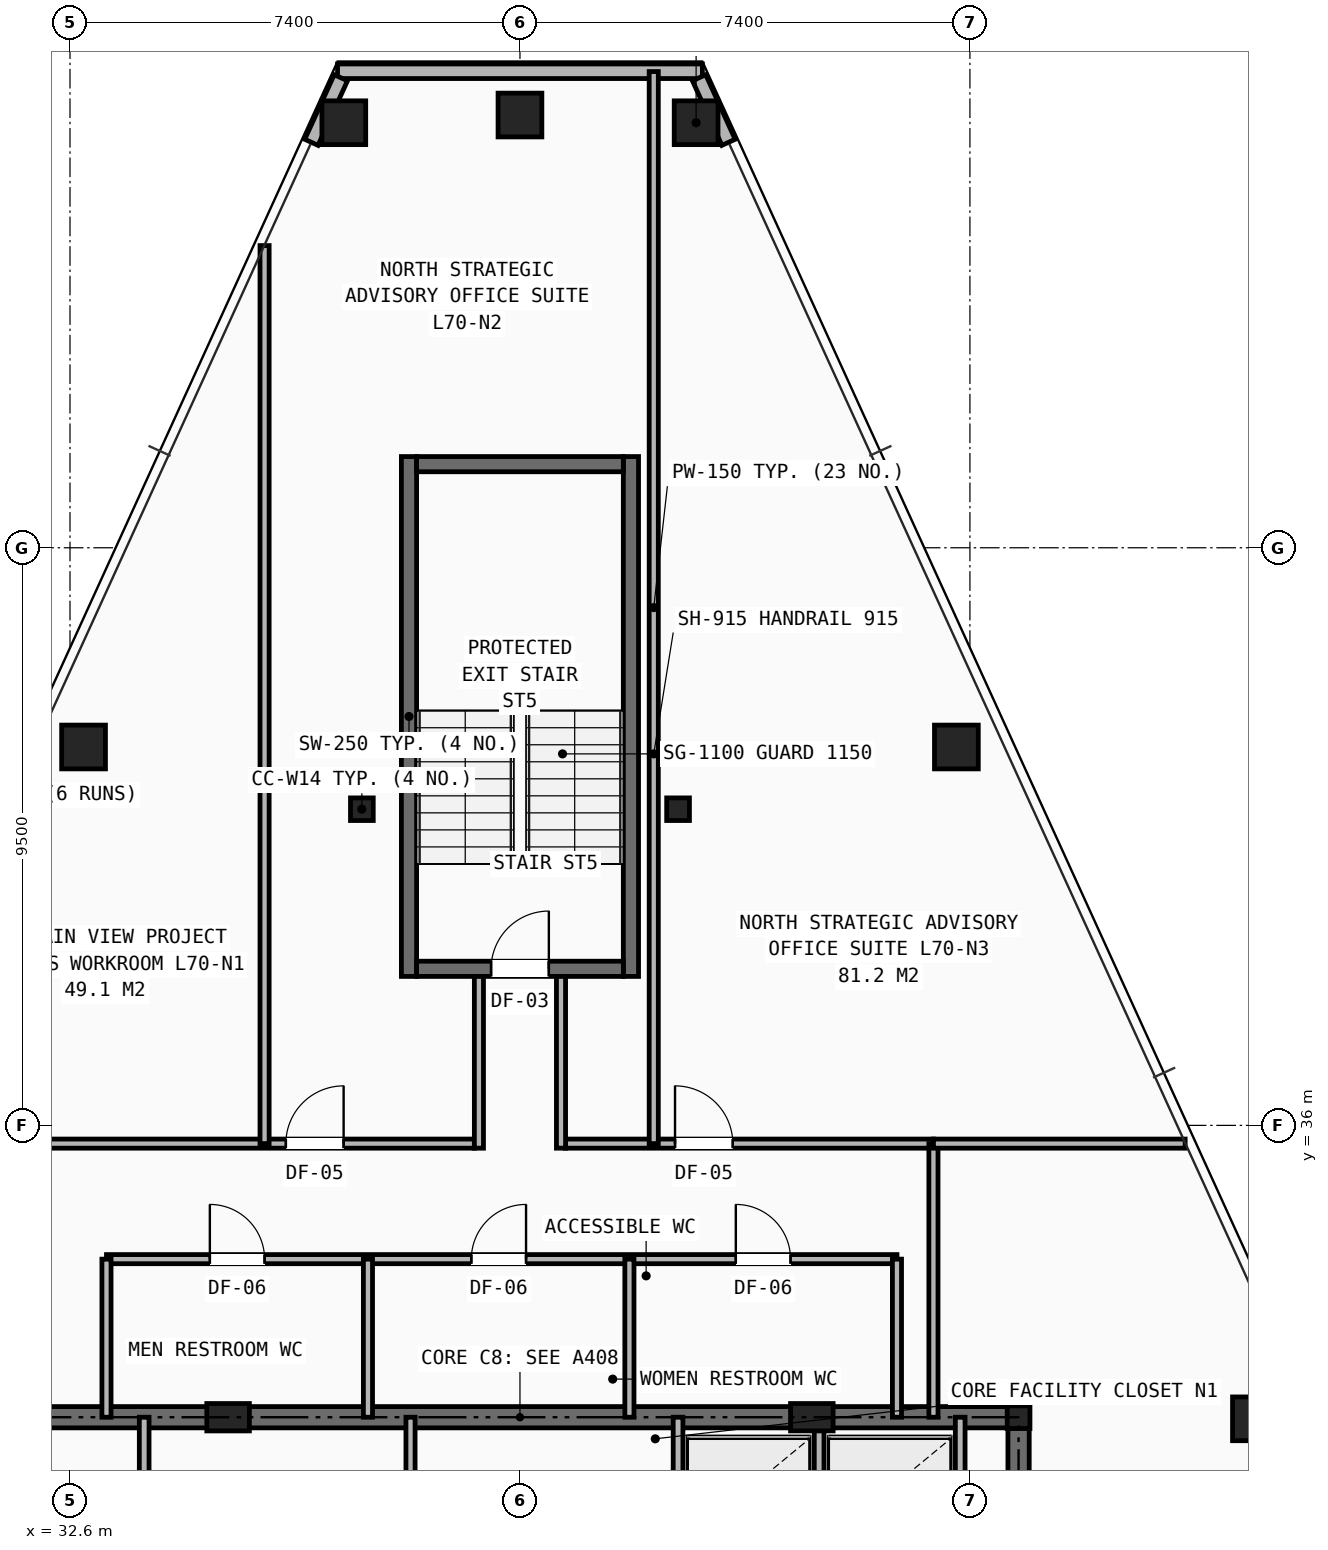
"""IFC4 building model, lengths in metres.
Left out: names, types, materials, properties, quantities, classifications, styles, units other than length and angle.
Written with IfcOpenShell. Run it as: python <this file> out.ifc"""

import sys

from ifc_helpers import new_model, si_unit, direction, frame, frame_2d, origin, origin_2d, place, context, subcontext, project, spatial, rectangle, hollow_rectangle, i_section, extrude, element, fill, save


model = new_model("IFC4")
c1 = context("Model", 3, precision=1e-05, world=origin(), true_north=direction((0.0, 1.0)))
c2 = subcontext(c1, "Body", "Model", "MODEL_VIEW")
j1 = project(units=[si_unit("LENGTHUNIT", "METRE"), si_unit("PLANEANGLEUNIT", "RADIAN")], contexts=[c1])
p1 = place(None, origin())
s1 = spatial("IfcSite", under=j1, at=p1, CompositionType="ELEMENT")
p2 = place(p1, origin())
s2 = spatial("IfcBuilding", under=s1, at=p2, CompositionType="ELEMENT")
p3 = place(p2, frame((0.0, 0.0, 246.9)))
s3 = spatial("IfcBuildingStorey", under=s2, at=p3, CompositionType="ELEMENT", Elevation=246.9)
for number, where, z_axis, x_axis in (
    (1, (48.2, 31.2, 0.0), (0.0, 0.0, 1.0), (1.0, 0.0, 0.0)),
    (2, (37.4, 41.2, 0.0), (0.0, 0.0, 1.0), (1.0, 0.0, 0.0)),
    (3, (42.6, 41.2, 0.0), (0.0, 0.0, 1.0), (1.0, 0.0, 0.0)),
):
    element("IfcColumn", number, at=place(p3, frame(where, z_axis=z_axis, x_axis=x_axis)), inside=s3, PredefinedType="COLUMN", context=c2, shape_type="SweptSolid", body=[
        extrude(i_section(OverallWidth=0.374, OverallDepth=0.372, WebThickness=0.016, FlangeThickness=0.026, at=origin_2d()), origin(), (0.0, 0.0, 1.0), 3.5),
    ])
for number, where, z_axis, x_axis in (
    (4, (35.2, 31.2, 0.0), (0.0, 0.0, 1.0), (1.0, 0.0, 0.0)),
    (5, (44.8, 31.2, 0.0), (0.0, 0.0, 1.0), (1.0, 0.0, 0.0)),
):
    element("IfcColumn", number, at=place(p3, frame(where, z_axis=z_axis, x_axis=x_axis)), inside=s3, PredefinedType="PILASTER", context=c2, shape_type="SweptSolid", body=[
        extrude(rectangle(XDim=0.7, YDim=0.45, at=origin_2d()), origin(), (0.0, 0.0, 1.0), 3.5),
    ])
for number, where, z_axis, x_axis in (
    (6, (42.897, 52.49, 0.0), (0.0, 0.0, 1.0), (1.0, 0.0, 0.0)),
    (7, (40.0, 52.617, 0.0), (0.0, 0.0, 1.0), (1.0, 0.0, 0.0)),
    (8, (37.103, 52.49, 0.0), (0.0, 0.0, 1.0), (1.0, 0.0, 0.0)),
    (9, (32.823, 42.223, 0.0), (0.0, 0.0, 1.0), (1.0, 0.0, 0.0)),
    (10, (52.079, 31.174, 0.0), (0.0, 0.0, 1.0), (1.0, 0.0, 0.0)),
    (11, (47.177, 42.223, 0.0), (0.0, 0.0, 1.0), (1.0, 0.0, 0.0)),
):
    element("IfcColumn", number, at=place(p3, frame(where, z_axis=z_axis, x_axis=x_axis)), inside=s3, PredefinedType="COLUMN", context=c2, shape_type="SweptSolid", body=[
        extrude(hollow_rectangle(XDim=0.72, YDim=0.72, WallThickness=0.05, at=origin_2d()), origin(), (0.0, 0.0, 1.0), 3.5),
    ])
p4 = place(p3, frame((37.0, 53.337, 0.0), z_axis=(0.0, 0.0, 1.0), x_axis=(1.0, 0.0, 0.0)))
e12 = element("IfcWall", 12, at=p4, inside=s3, PredefinedType="SHEAR", context=c2, shape_type="SweptSolid", body=[
    extrude(rectangle(XDim=6.0, YDim=0.24, at=frame_2d((3.0, 0.0))), origin(), (0.0, 0.0, 1.0), 2.573),
])
for number, where, z_axis, x_axis in (
    (13, (37.054, 53.23, 0.0), (0.0, 0.0, 1.0), (-0.415, -0.91, 0.0)),
    (14, (43.43, 52.168, 0.0), (0.0, 0.0, 1.0), (-0.415, 0.91, 0.0)),
):
    element("IfcWall", number, at=place(p3, frame(where, z_axis=z_axis, x_axis=x_axis)), inside=s3, PredefinedType="SHEAR", context=c2, shape_type="SweptSolid", body=[
        extrude(rectangle(XDim=1.167, YDim=0.24, at=frame_2d((0.583, 0.0))), origin(), (0.0, 0.0, 1.0), 2.573),
    ])
p5 = place(p3, frame((31.8, 31.2, 0.0), z_axis=(0.0, 0.0, 1.0), x_axis=(1.0, 0.0, 0.0)))
e15 = element("IfcWall", 15, at=p5, inside=s3, PredefinedType="SHEAR", context=c2, shape_type="SweptSolid", body=[
    extrude(rectangle(XDim=16.4, YDim=0.35, at=frame_2d((8.2, 0.0))), origin(), (0.0, 0.0, 1.0), 3.2),
])
p6 = place(p3, frame((48.2, 16.4, 0.0), z_axis=(0.0, 0.0, 1.0), x_axis=(0.0, 1.0, 0.0)))
e16 = element("IfcWall", 16, at=p6, inside=s3, PredefinedType="SHEAR", context=c2, shape_type="SweptSolid", body=[
    extrude(rectangle(XDim=14.8, YDim=0.35, at=frame_2d((7.4, 0.0))), origin(), (0.0, 0.0, 1.0), 3.2),
])
p7 = place(p6, frame((11.0, 0.0, 0.0)))
e17 = element("IfcOpeningElement", 17, at=p7, cuts=e16, PredefinedType="OPENING", context=c2, shape_type="SweptSolid", body=[
    extrude(rectangle(XDim=1.1, YDim=2.15, at=frame_2d((0.55, 1.075))), frame((0.0, 0.185, 0.0), z_axis=(0.0, -1.0, 0.0), x_axis=(1.0, 0.0, 0.0)), (0.0, 0.0, 1.0), 0.37),
])
p8 = place(p3, frame((33.82, 29.02, 0.0), z_axis=(0.0, 0.0, 1.0), x_axis=(0.0, 1.0, 0.0)))
e18 = element("IfcWall", 18, at=p8, inside=s3, PredefinedType="SOLIDWALL", context=c2, shape_type="SweptSolid", body=[
    extrude(rectangle(XDim=2.18, YDim=0.16, at=frame_2d((1.09, 0.0))), origin(), (0.0, 0.0, 1.0), 2.928),
])
p9 = place(p3, frame((38.2, 29.02, 0.0), z_axis=(0.0, 0.0, 1.0), x_axis=(0.0, 1.0, 0.0)))
e19 = element("IfcWall", 19, at=p9, inside=s3, PredefinedType="PARTITIONING", context=c2, shape_type="SweptSolid", body=[
    extrude(rectangle(XDim=2.18, YDim=0.15, at=frame_2d((1.09, 0.0))), origin(), (0.0, 0.0, 1.0), 2.928),
])
for number, where, z_axis, x_axis in (
    (20, (42.6, 29.02, 0.0), (0.0, 0.0, 1.0), (0.0, 1.0, 0.0)),
    (21, (44.92, 29.02, 0.0), (0.0, 0.0, 1.0), (0.0, 1.0, 0.0)),
    (22, (47.24, 29.02, 0.0), (0.0, 0.0, 1.0), (0.0, 1.0, 0.0)),
):
    element("IfcWall", number, at=place(p3, frame(where, z_axis=z_axis, x_axis=x_axis)), inside=s3, PredefinedType="SOLIDWALL", context=c2, shape_type="SweptSolid", body=[
        extrude(rectangle(XDim=2.18, YDim=0.16, at=frame_2d((1.09, 0.0))), origin(), (0.0, 0.0, 1.0), 2.928),
    ])
p10 = place(p3, frame((33.2, 33.8, 0.0), z_axis=(0.0, 0.0, 1.0), x_axis=(1.0, 0.0, 0.0)))
e23 = element("IfcWall", 23, at=p10, inside=s3, PredefinedType="PARTITIONING", context=c2, shape_type="SweptSolid", body=[
    extrude(rectangle(XDim=13.0, YDim=0.15, at=frame_2d((6.5, 0.0))), origin(), (0.0, 0.0, 1.0), 3.2),
])
p11 = place(p10, frame((1.7, 0.0, 0.0)))
e24 = element("IfcOpeningElement", 24, at=p11, cuts=e23, PredefinedType="OPENING", context=c2, shape_type="SweptSolid", body=[
    extrude(rectangle(XDim=0.9, YDim=2.1, at=frame_2d((0.45, 1.05))), frame((0.0, 0.085, 0.0), z_axis=(0.0, -1.0, 0.0), x_axis=(1.0, 0.0, 0.0)), (0.0, 0.0, 1.0), 0.17),
])
p12 = place(p10, frame((6.0, 0.0, 0.0)))
e25 = element("IfcOpeningElement", 25, at=p12, cuts=e23, PredefinedType="OPENING", context=c2, shape_type="SweptSolid", body=[
    extrude(rectangle(XDim=0.9, YDim=2.1, at=frame_2d((0.45, 1.05))), frame((0.0, 0.085, 0.0), z_axis=(0.0, -1.0, 0.0), x_axis=(1.0, 0.0, 0.0)), (0.0, 0.0, 1.0), 0.17),
])
p13 = place(p10, frame((10.35, 0.0, 0.0)))
e26 = element("IfcOpeningElement", 26, at=p13, cuts=e23, PredefinedType="OPENING", context=c2, shape_type="SweptSolid", body=[
    extrude(rectangle(XDim=0.9, YDim=2.1, at=frame_2d((0.45, 1.05))), frame((0.0, 0.085, 0.0), z_axis=(0.0, -1.0, 0.0), x_axis=(1.0, 0.0, 0.0)), (0.0, 0.0, 1.0), 0.17),
])
for number, where, z_axis, x_axis in (
    (27, (33.2, 31.2, 0.0), (0.0, 0.0, 1.0), (0.0, 1.0, 0.0)),
    (28, (46.2, 31.2, 0.0), (0.0, 0.0, 1.0), (0.0, 1.0, 0.0)),
    (29, (37.5, 31.2, 0.0), (0.0, 0.0, 1.0), (0.0, 1.0, 0.0)),
    (30, (41.8, 31.2, 0.0), (0.0, 0.0, 1.0), (0.0, 1.0, 0.0)),
):
    element("IfcWall", number, at=place(p3, frame(where, z_axis=z_axis, x_axis=x_axis)), inside=s3, PredefinedType="PARTITIONING", context=c2, shape_type="SweptSolid", body=[
        extrude(rectangle(XDim=2.6, YDim=0.15, at=frame_2d((1.3, 0.0))), origin(), (0.0, 0.0, 1.0), 2.928),
    ])
p14 = place(p3, frame((29.8, 35.7, 0.0), z_axis=(0.0, 0.0, 1.0), x_axis=(1.0, 0.0, 0.0)))
e31 = element("IfcWall", 31, at=p14, inside=s3, PredefinedType="PARTITIONING", context=c2, shape_type="SweptSolid", body=[
    extrude(rectangle(XDim=9.45, YDim=0.15, at=frame_2d((4.725, 0.0))), origin(), (0.0, 0.0, 1.0), 2.578),
])
p15 = place(p14, frame((0.55, 0.0, 0.0)))
e32 = element("IfcOpeningElement", 32, at=p15, cuts=e31, PredefinedType="OPENING", context=c2, shape_type="SweptSolid", body=[
    extrude(rectangle(XDim=0.95, YDim=2.1, at=frame_2d((0.475, 1.05))), frame((0.0, 0.085, 0.0), z_axis=(0.0, -1.0, 0.0), x_axis=(1.0, 0.0, 0.0)), (0.0, 0.0, 1.0), 0.17),
])
p16 = place(p14, frame((6.35, 0.0, 0.0)))
e33 = element("IfcOpeningElement", 33, at=p16, cuts=e31, PredefinedType="OPENING", context=c2, shape_type="SweptSolid", body=[
    extrude(rectangle(XDim=0.95, YDim=2.1, at=frame_2d((0.475, 1.05))), frame((0.0, 0.085, 0.0), z_axis=(0.0, -1.0, 0.0), x_axis=(1.0, 0.0, 0.0)), (0.0, 0.0, 1.0), 0.17),
])
p17 = place(p3, frame((40.75, 35.7, 0.0), z_axis=(0.0, 0.0, 1.0), x_axis=(1.0, 0.0, 0.0)))
e34 = element("IfcWall", 34, at=p17, inside=s3, PredefinedType="PARTITIONING", context=c2, shape_type="SweptSolid", body=[
    extrude(rectangle(XDim=6.05, YDim=0.15, at=frame_2d((3.025, 0.0))), origin(), (0.0, 0.0, 1.0), 3.2),
])
p18 = place(p17, frame((1.8, 0.0, 0.0)))
e35 = element("IfcOpeningElement", 35, at=p18, cuts=e34, PredefinedType="OPENING", context=c2, shape_type="SweptSolid", body=[
    extrude(rectangle(XDim=0.95, YDim=2.1, at=frame_2d((0.475, 1.05))), frame((0.0, 0.085, 0.0), z_axis=(0.0, -1.0, 0.0), x_axis=(1.0, 0.0, 0.0)), (0.0, 0.0, 1.0), 0.17),
])
p19 = place(p3, frame((46.8, 31.2, 0.0), z_axis=(0.0, 0.0, 1.0), x_axis=(0.0, 1.0, 0.0)))
e36 = element("IfcWall", 36, at=p19, inside=s3, PredefinedType="PARTITIONING", context=c2, shape_type="SweptSolid", body=[
    extrude(rectangle(XDim=4.5, YDim=0.15, at=frame_2d((2.25, 0.0))), origin(), (0.0, 0.0, 1.0), 2.928),
])
p20 = place(p3, frame((46.8, 35.7, 0.0), z_axis=(0.0, 0.0, 1.0), x_axis=(1.0, 0.0, 0.0)))
e37 = element("IfcWall", 37, at=p20, inside=s3, PredefinedType="PARTITIONING", context=c2, shape_type="SweptSolid", body=[
    extrude(rectangle(XDim=4.14, YDim=0.15, at=frame_2d((2.07, 0.0))), origin(), (0.0, 0.0, 1.0), 2.578),
])
p21 = place(p3, frame((35.8, 35.7, 0.0), z_axis=(0.0, 0.0, 1.0), x_axis=(0.0, 1.0, 0.0)))
e38 = element("IfcWall", 38, at=p21, inside=s3, PredefinedType="PARTITIONING", context=c2, shape_type="SweptSolid", body=[
    extrude(rectangle(XDim=14.77, YDim=0.15, at=frame_2d((7.385, 0.0))), origin(), (0.0, 0.0, 1.0), 2.215),
])
p22 = place(p3, frame((42.2, 35.7, 0.0), z_axis=(0.0, 0.0, 1.0), x_axis=(0.0, 1.0, 0.0)))
e39 = element("IfcWall", 39, at=p22, inside=s3, PredefinedType="PARTITIONING", context=c2, shape_type="SweptSolid", body=[
    extrude(rectangle(XDim=17.632, YDim=0.15, at=frame_2d((8.816, 0.0))), origin(), (0.0, 0.0, 1.0), 2.215),
])
for number, where, z_axis, x_axis in (
    (40, (38.175, 38.45, 0.0), (0.0, 0.0, 1.0), (0.0, 1.0, 0.0)),
    (41, (41.825, 38.45, 0.0), (0.0, 0.0, 1.0), (0.0, 1.0, 0.0)),
):
    element("IfcWall", number, at=place(p3, frame(where, z_axis=z_axis, x_axis=x_axis)), inside=s3, PredefinedType="SHEAR", context=c2, shape_type="SweptSolid", body=[
        extrude(rectangle(XDim=8.55, YDim=0.25, at=frame_2d((4.275, 0.0))), origin(), (0.0, 0.0, 1.0), 3.2),
    ])
p23 = place(p3, frame((38.3, 38.575, 0.0), z_axis=(0.0, 0.0, 1.0), x_axis=(1.0, 0.0, 0.0)))
e42 = element("IfcWall", 42, at=p23, inside=s3, PredefinedType="SHEAR", context=c2, shape_type="SweptSolid", body=[
    extrude(rectangle(XDim=3.4, YDim=0.25, at=frame_2d((1.7, 0.0))), origin(), (0.0, 0.0, 1.0), 3.2),
])
p24 = place(p23, frame((1.225, 0.0, 0.0)))
e43 = element("IfcOpeningElement", 43, at=p24, cuts=e42, PredefinedType="OPENING", context=c2, shape_type="SweptSolid", body=[
    extrude(rectangle(XDim=0.95, YDim=2.1, at=frame_2d((0.475, 1.05))), frame((0.0, 0.135, 0.0), z_axis=(0.0, -1.0, 0.0), x_axis=(1.0, 0.0, 0.0)), (0.0, 0.0, 1.0), 0.27),
])
p25 = place(p3, frame((38.3, 46.875, 0.0), z_axis=(0.0, 0.0, 1.0), x_axis=(1.0, 0.0, 0.0)))
e44 = element("IfcWall", 44, at=p25, inside=s3, PredefinedType="SHEAR", context=c2, shape_type="SweptSolid", body=[
    extrude(rectangle(XDim=3.4, YDim=0.25, at=frame_2d((1.7, 0.0))), origin(), (0.0, 0.0, 1.0), 3.2),
])
for number, where, z_axis, x_axis in (
    (45, (39.325, 35.625, 0.0), (0.0, 0.0, 1.0), (0.0, 1.0, 0.0)),
    (46, (40.675, 35.625, 0.0), (0.0, 0.0, 1.0), (0.0, 1.0, 0.0)),
):
    element("IfcWall", number, at=place(p3, frame(where, z_axis=z_axis, x_axis=x_axis)), inside=s3, PredefinedType="PARTITIONING", context=c2, shape_type="SweptSolid", body=[
        extrude(rectangle(XDim=2.825, YDim=0.15, at=frame_2d((1.413, 0.0))), origin(), (0.0, 0.0, 1.0), 3.2),
    ])
p26 = place(p11, origin())
e47 = element("IfcDoor", 47, at=p26, inside=s3, OperationType="SINGLE_SWING_LEFT", PredefinedType="DOOR", context=c2, shape_type="SweptSolid", body=[
    extrude(rectangle(XDim=0.9, YDim=2.1, at=frame_2d((0.45, 1.05))), frame((0.0, 0.025, 0.0), z_axis=(0.0, -1.0, 0.0), x_axis=(1.0, 0.0, 0.0)), (0.0, 0.0, 1.0), 0.05),
])
fill(e24, e47)
p27 = place(p12, origin())
e48 = element("IfcDoor", 48, at=p27, inside=s3, OperationType="SINGLE_SWING_RIGHT", PredefinedType="DOOR", context=c2, shape_type="SweptSolid", body=[
    extrude(rectangle(XDim=0.9, YDim=2.1, at=frame_2d((0.45, 1.05))), frame((0.0, 0.025, 0.0), z_axis=(0.0, -1.0, 0.0), x_axis=(1.0, 0.0, 0.0)), (0.0, 0.0, 1.0), 0.05),
])
fill(e25, e48)
p28 = place(p13, origin())
e49 = element("IfcDoor", 49, at=p28, inside=s3, OperationType="SINGLE_SWING_LEFT", PredefinedType="DOOR", context=c2, shape_type="SweptSolid", body=[
    extrude(rectangle(XDim=0.9, YDim=2.1, at=frame_2d((0.45, 1.05))), frame((0.0, 0.025, 0.0), z_axis=(0.0, -1.0, 0.0), x_axis=(1.0, 0.0, 0.0)), (0.0, 0.0, 1.0), 0.05),
])
fill(e26, e49)
p29 = place(p16, origin())
e50 = element("IfcDoor", 50, at=p29, inside=s3, OperationType="SINGLE_SWING_RIGHT", PredefinedType="DOOR", context=c2, shape_type="SweptSolid", body=[
    extrude(rectangle(XDim=0.95, YDim=2.1, at=frame_2d((0.475, 1.05))), frame((0.0, 0.025, 0.0), z_axis=(0.0, -1.0, 0.0), x_axis=(1.0, 0.0, 0.0)), (0.0, 0.0, 1.0), 0.05),
])
fill(e33, e50)
p30 = place(p18, origin())
e51 = element("IfcDoor", 51, at=p30, inside=s3, OperationType="SINGLE_SWING_LEFT", PredefinedType="DOOR", context=c2, shape_type="SweptSolid", body=[
    extrude(rectangle(XDim=0.95, YDim=2.1, at=frame_2d((0.475, 1.05))), frame((0.0, 0.025, 0.0), z_axis=(0.0, -1.0, 0.0), x_axis=(1.0, 0.0, 0.0)), (0.0, 0.0, 1.0), 0.05),
])
fill(e35, e51)
p31 = place(p24, origin())
e52 = element("IfcDoor", 52, at=p31, inside=s3, OperationType="SINGLE_SWING_RIGHT", PredefinedType="DOOR", context=c2, shape_type="SweptSolid", body=[
    extrude(rectangle(XDim=0.95, YDim=2.1, at=frame_2d((0.475, 1.05))), frame((0.0, 0.025, 0.0), z_axis=(0.0, -1.0, 0.0), x_axis=(1.0, 0.0, 0.0)), (0.0, 0.0, 1.0), 0.05),
])
fill(e43, e52)
save(model, sys.argv[1])
